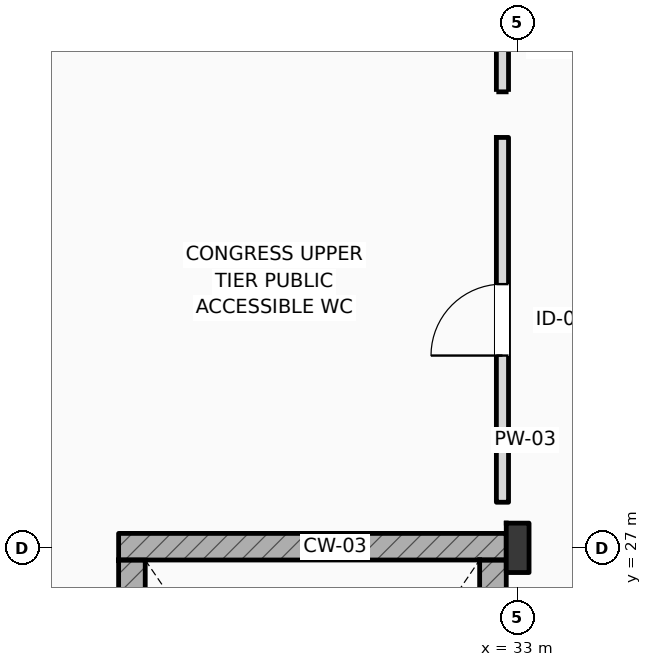
"""IFC4 building model, lengths in metres.
Left out: names, types, materials, properties, quantities, classifications, styles, units other than length and angle.
Written with IfcOpenShell. Run it as: python <this file> out.ifc"""

import sys

from ifc_helpers import new_model, si_unit, direction, frame, frame_2d, origin, origin_2d, place, context, subcontext, project, spatial, rectangle, i_section, extrude, element, fill, save


model = new_model("IFC4")
c1 = context("Model", 3, precision=1e-05, world=origin(), true_north=direction((0.0, 1.0)))
c2 = subcontext(c1, "Body", "Model", "MODEL_VIEW")
j1 = project(units=[si_unit("LENGTHUNIT", "METRE"), si_unit("PLANEANGLEUNIT", "RADIAN")], contexts=[c1])
p1 = place(None, origin())
s1 = spatial("IfcSite", under=j1, at=p1, CompositionType="ELEMENT")
p2 = place(p1, origin())
s2 = spatial("IfcBuilding", under=s1, at=p2, CompositionType="ELEMENT")
p3 = place(p2, frame((0.0, 0.0, 6.0)))
s3 = spatial("IfcBuildingStorey", under=s2, at=p3, CompositionType="ELEMENT", Elevation=6.0)
p4 = place(p3, frame((33.0, 27.0, 0.0), z_axis=(0.0, 0.0, 1.0), x_axis=(1.0, 0.0, 0.0)))
e1 = element("IfcColumn", 1, at=p4, inside=s3, PredefinedType="COLUMN", context=c2, shape_type="SweptSolid", body=[
    extrude(i_section(OverallWidth=0.3, OverallDepth=0.65, WebThickness=0.016, FlangeThickness=0.031, FilletRadius=0.027, at=origin_2d()), origin(), (0.0, 0.0, 1.0), 5.4),
])
p5 = place(p3, frame((27.75, 27.015, 0.0), z_axis=(0.0, 0.0, 1.0), x_axis=(1.0, 0.0, 0.0)))
e2 = element("IfcWall", 2, at=p5, inside=s3, PredefinedType="SHEAR", context=c2, shape_type="SweptSolid", body=[
    extrude(rectangle(XDim=5.1, YDim=0.35, at=frame_2d((2.55, 0.0))), origin(), (0.0, 0.0, 1.0), 5.4),
])
p6 = place(p3, frame((27.925, 18.16, 0.0), z_axis=(0.0, 0.0, 1.0), x_axis=(0.0, 1.0, 0.0)))
e3 = element("IfcWall", 3, at=p6, inside=s3, PredefinedType="SHEAR", context=c2, shape_type="SweptSolid", body=[
    extrude(rectangle(XDim=8.68, YDim=0.35, at=frame_2d((4.34, 0.0))), origin(), (0.0, 0.0, 1.0), 5.4),
])
p7 = place(p3, frame((32.675, 18.16, 0.0), z_axis=(0.0, 0.0, 1.0), x_axis=(0.0, 1.0, 0.0)))
e4 = element("IfcWall", 4, at=p7, inside=s3, PredefinedType="SHEAR", context=c2, shape_type="SweptSolid", body=[
    extrude(rectangle(XDim=8.68, YDim=0.35, at=frame_2d((4.34, 0.0))), origin(), (0.0, 0.0, 1.0), 5.4),
])
p8 = place(p7, frame((0.25, 0.0, 0.0)))
e5 = element("IfcOpeningElement", 5, at=p8, cuts=e4, PredefinedType="OPENING", context=c2, shape_type="SweptSolid", body=[
    extrude(rectangle(XDim=1.6, YDim=2.2, at=frame_2d((0.8, 1.1))), frame((0.0, 0.185, 0.0), z_axis=(0.0, -1.0, 0.0), x_axis=(1.0, 0.0, 0.0)), (0.0, 0.0, 1.0), 0.37),
])
p9 = place(p3, frame((32.8, 27.6, 0.0), z_axis=(0.0, 0.0, 1.0), x_axis=(0.0, 1.0, 0.0)))
e6 = element("IfcWall", 6, at=p9, inside=s3, PredefinedType="PARTITIONING", context=c2, shape_type="SweptSolid", body=[
    extrude(rectangle(XDim=4.8, YDim=0.16, at=frame_2d((2.4, 0.0))), origin(), (0.0, 0.0, 1.0), 4.55),
])
p10 = place(p9, frame((1.93, 0.0, 0.0)))
e7 = element("IfcOpeningElement", 7, at=p10, cuts=e6, PredefinedType="OPENING", context=c2, shape_type="SweptSolid", body=[
    extrude(rectangle(XDim=0.94, YDim=2.15, at=frame_2d((0.47, 1.075))), frame((0.0, 0.09, 0.0), z_axis=(0.0, -1.0, 0.0), x_axis=(1.0, 0.0, 0.0)), (0.0, 0.0, 1.0), 0.18),
])
p11 = place(p3, frame((32.8, 33.0, 0.0), z_axis=(0.0, 0.0, 1.0), x_axis=(0.0, 1.0, 0.0)))
e8 = element("IfcWall", 8, at=p11, inside=s3, PredefinedType="PARTITIONING", context=c2, shape_type="SweptSolid", body=[
    extrude(rectangle(XDim=11.1, YDim=0.16, at=frame_2d((5.55, 0.0))), origin(), (0.0, 0.0, 1.0), 4.55),
])
p12 = place(p11, frame((5.1, 0.0, 0.0)))
e9 = element("IfcOpeningElement", 9, at=p12, cuts=e8, PredefinedType="OPENING", context=c2, shape_type="SweptSolid", body=[
    extrude(rectangle(XDim=0.9, YDim=2.1, at=frame_2d((0.45, 1.05))), frame((0.0, 0.09, 0.0), z_axis=(0.0, -1.0, 0.0), x_axis=(1.0, 0.0, 0.0)), (0.0, 0.0, 1.0), 0.18),
])
p13 = place(p10, origin())
e10 = element("IfcDoor", 10, at=p13, inside=s3, OperationType="SINGLE_SWING_LEFT", PredefinedType="DOOR", context=c2, shape_type="SweptSolid", body=[
    extrude(rectangle(XDim=0.94, YDim=2.15, at=frame_2d((0.47, 1.075))), frame((0.0, 0.025, 0.0), z_axis=(0.0, -1.0, 0.0), x_axis=(1.0, 0.0, 0.0)), (0.0, 0.0, 1.0), 0.05),
])
fill(e7, e10)
save(model, sys.argv[1])
